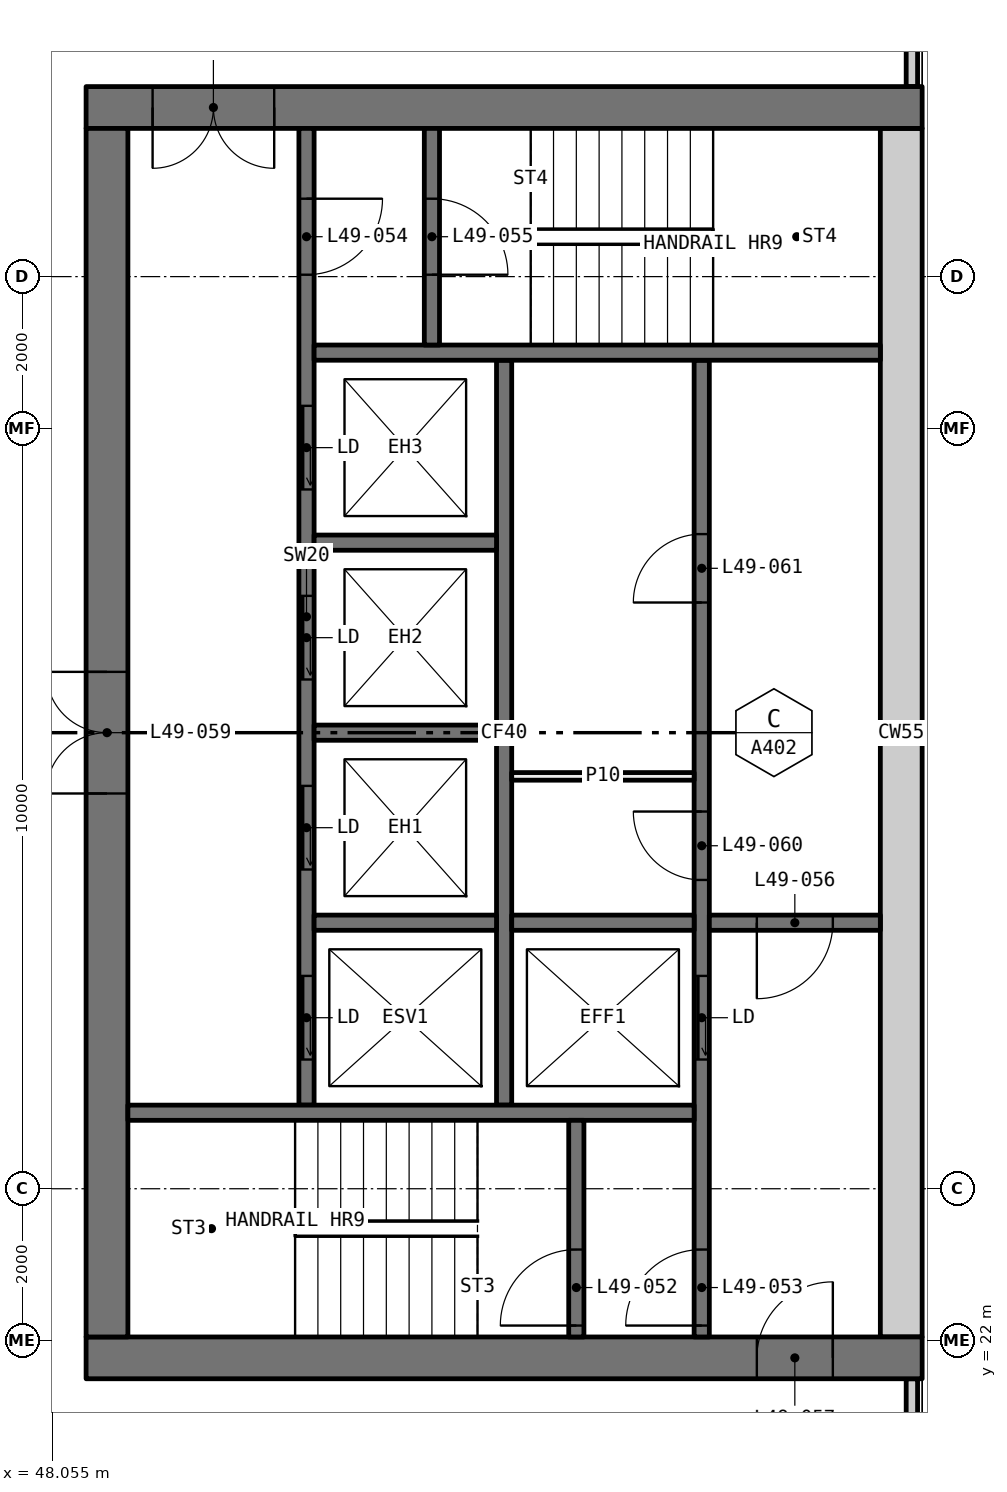
"""IFC4 building model, lengths in metres.
Left out: names, types, materials, properties, quantities, classifications, styles, units other than length and angle.
Written with IfcOpenShell. Run it as: python <this file> out.ifc"""

import sys

from ifc_helpers import new_model, si_unit, direction, frame, frame_2d, origin, place, context, subcontext, project, spatial, rectangle, extrude, element, fill, save


model = new_model("IFC4")
c1 = context("Model", 3, precision=1e-05, world=origin(), true_north=direction((0.0, 1.0)))
c2 = subcontext(c1, "Body", "Model", "MODEL_VIEW")
j1 = project(units=[si_unit("LENGTHUNIT", "METRE"), si_unit("PLANEANGLEUNIT", "RADIAN")], contexts=[c1])
p1 = place(None, origin())
s1 = spatial("IfcSite", under=j1, at=p1, CompositionType="ELEMENT")
p2 = place(p1, origin())
s2 = spatial("IfcBuilding", under=s1, at=p2, CompositionType="ELEMENT")
p3 = place(p2, frame((0.0, 0.0, 185.85)))
s3 = spatial("IfcBuildingStorey", under=s2, at=p3, CompositionType="ELEMENT", Elevation=185.85)
for number, where, z_axis, x_axis in (
    (1, (59.365, 18.71, 0.0), (0.0, 0.0, 1.0), (0.0, 1.0, 0.0)),
    (2, (59.365, 38.5, 0.0), (0.0, 0.0, 1.0), (0.0, 1.0, 0.0)),
):
    element("IfcWall", number, at=place(p3, frame(where, z_axis=z_axis, x_axis=x_axis)), inside=s3, PredefinedType="ELEMENTEDWALL", context=c2, shape_type="SweptSolid", body=[
        extrude(rectangle(XDim=2.79, YDim=0.15, at=frame_2d((1.395, 0.0))), origin(), (0.0, 0.0, 1.0), 3.05),
    ])
p4 = place(p3, frame((59.5, 21.775, 0.0), z_axis=(0.0, 0.0, 1.0), x_axis=(-1.0, 0.0, 0.0)))
e3 = element("IfcWall", 3, at=p4, inside=s3, PredefinedType="SHEAR", context=c2, shape_type="SweptSolid", body=[
    extrude(rectangle(XDim=11.0, YDim=0.55, at=frame_2d((5.5, 0.0))), origin(), (0.0, 0.0, 1.0), 3.05),
])
p5 = place(p4, frame((1.175, 0.0, 0.0)))
e4 = element("IfcOpeningElement", 4, at=p5, cuts=e3, PredefinedType="OPENING", context=c2, shape_type="SweptSolid", body=[
    extrude(rectangle(XDim=1.0, YDim=2.1, at=frame_2d((0.5, 1.05))), frame((0.0, 0.285, 0.0), z_axis=(0.0, -1.0, 0.0), x_axis=(1.0, 0.0, 0.0)), (0.0, 0.0, 1.0), 0.57),
])
p6 = place(p3, frame((59.5, 38.225, 0.0), z_axis=(0.0, 0.0, 1.0), x_axis=(-1.0, 0.0, 0.0)))
e5 = element("IfcWall", 5, at=p6, inside=s3, PredefinedType="SHEAR", context=c2, shape_type="SweptSolid", body=[
    extrude(rectangle(XDim=11.0, YDim=0.55, at=frame_2d((5.5, 0.0))), origin(), (0.0, 0.0, 1.0), 3.05),
])
p7 = place(p6, frame((8.525, 0.0, 0.0)))
e6 = element("IfcOpeningElement", 6, at=p7, cuts=e5, PredefinedType="OPENING", context=c2, shape_type="SweptSolid", body=[
    extrude(rectangle(XDim=1.6, YDim=2.1, at=frame_2d((0.8, 1.05))), frame((0.0, 0.285, 0.0), z_axis=(0.0, -1.0, 0.0), x_axis=(1.0, 0.0, 0.0)), (0.0, 0.0, 1.0), 0.57),
])
p8 = place(p3, frame((59.225, 22.05, 0.0), z_axis=(0.0, 0.0, 1.0), x_axis=(0.0, 1.0, 0.0)))
e7 = element("IfcWall", 7, at=p8, inside=s3, PredefinedType="SHEAR", context=c2, shape_type="SweptSolid", body=[
    extrude(rectangle(XDim=15.9, YDim=0.55, at=frame_2d((7.95, 0.0))), origin(), (0.0, 0.0, 1.0), 3.05),
])
p9 = place(p3, frame((48.775, 22.05, 0.0), z_axis=(0.0, 0.0, 1.0), x_axis=(0.0, 1.0, 0.0)))
e8 = element("IfcWall", 8, at=p9, inside=s3, PredefinedType="SHEAR", context=c2, shape_type="SweptSolid", body=[
    extrude(rectangle(XDim=15.9, YDim=0.55, at=frame_2d((7.95, 0.0))), origin(), (0.0, 0.0, 1.0), 3.05),
])
p10 = place(p9, frame((7.15, 0.0, 0.0)))
e9 = element("IfcOpeningElement", 9, at=p10, cuts=e8, PredefinedType="OPENING", context=c2, shape_type="SweptSolid", body=[
    extrude(rectangle(XDim=1.6, YDim=2.1, at=frame_2d((0.8, 1.05))), frame((0.0, 0.285, 0.0), z_axis=(0.0, -1.0, 0.0), x_axis=(1.0, 0.0, 0.0)), (0.0, 0.0, 1.0), 0.57),
])
p11 = place(p3, frame((56.6, 22.05, 0.0), z_axis=(0.0, 0.0, 1.0), x_axis=(0.0, 1.0, 0.0)))
e10 = element("IfcWall", 10, at=p11, inside=s3, PredefinedType="SOLIDWALL", context=c2, shape_type="SweptSolid", body=[
    extrude(rectangle(XDim=12.85, YDim=0.2, at=frame_2d((6.425, 0.0))), origin(), (0.0, 0.0, 1.0), 3.05),
])
p12 = place(p11, frame((3.65, 0.0, 0.0)))
e11 = element("IfcOpeningElement", 11, at=p12, cuts=e10, PredefinedType="OPENING", context=c2, shape_type="SweptSolid", body=[
    extrude(rectangle(XDim=1.1, YDim=2.1, at=frame_2d((0.55, 1.05))), frame((0.0, 0.11, 0.0), z_axis=(0.0, -1.0, 0.0), x_axis=(1.0, 0.0, 0.0)), (0.0, 0.0, 1.0), 0.22),
])
p13 = place(p11, frame((0.15, 0.0, 0.0)))
e12 = element("IfcOpeningElement", 12, at=p13, cuts=e10, PredefinedType="OPENING", context=c2, shape_type="SweptSolid", body=[
    extrude(rectangle(XDim=1.0, YDim=2.1, at=frame_2d((0.5, 1.05))), frame((0.0, 0.11, 0.0), z_axis=(0.0, -1.0, 0.0), x_axis=(1.0, 0.0, 0.0)), (0.0, 0.0, 1.0), 0.22),
])
p14 = place(p11, frame((6.012, 0.0, 0.0)))
e13 = element("IfcOpeningElement", 13, at=p14, cuts=e10, PredefinedType="OPENING", context=c2, shape_type="SweptSolid", body=[
    extrude(rectangle(XDim=0.9, YDim=2.1, at=frame_2d((0.45, 1.05))), frame((0.0, 0.11, 0.0), z_axis=(0.0, -1.0, 0.0), x_axis=(1.0, 0.0, 0.0)), (0.0, 0.0, 1.0), 0.22),
])
p15 = place(p11, frame((9.663, 0.0, 0.0)))
e14 = element("IfcOpeningElement", 14, at=p15, cuts=e10, PredefinedType="OPENING", context=c2, shape_type="SweptSolid", body=[
    extrude(rectangle(XDim=0.9, YDim=2.1, at=frame_2d((0.45, 1.05))), frame((0.0, 0.11, 0.0), z_axis=(0.0, -1.0, 0.0), x_axis=(1.0, 0.0, 0.0)), (0.0, 0.0, 1.0), 0.22),
])
p16 = place(p3, frame((51.4, 25.1, 0.0), z_axis=(0.0, 0.0, 1.0), x_axis=(0.0, 1.0, 0.0)))
e15 = element("IfcWall", 15, at=p16, inside=s3, PredefinedType="SOLIDWALL", context=c2, shape_type="SweptSolid", body=[
    extrude(rectangle(XDim=12.85, YDim=0.2, at=frame_2d((6.425, 0.0))), origin(), (0.0, 0.0, 1.0), 3.05),
])
p17 = place(p16, frame((0.6, 0.0, 0.0)))
e16 = element("IfcOpeningElement", 16, at=p17, cuts=e15, PredefinedType="OPENING", context=c2, shape_type="SweptSolid", body=[
    extrude(rectangle(XDim=1.1, YDim=2.1, at=frame_2d((0.55, 1.05))), frame((0.0, 0.11, 0.0), z_axis=(0.0, -1.0, 0.0), x_axis=(1.0, 0.0, 0.0)), (0.0, 0.0, 1.0), 0.22),
])
p18 = place(p16, frame((3.1, 0.0, 0.0)))
e17 = element("IfcOpeningElement", 17, at=p18, cuts=e15, PredefinedType="OPENING", context=c2, shape_type="SweptSolid", body=[
    extrude(rectangle(XDim=1.1, YDim=2.1, at=frame_2d((0.55, 1.05))), frame((0.0, 0.11, 0.0), z_axis=(0.0, -1.0, 0.0), x_axis=(1.0, 0.0, 0.0)), (0.0, 0.0, 1.0), 0.22),
])
p19 = place(p16, frame((5.6, 0.0, 0.0)))
e18 = element("IfcOpeningElement", 18, at=p19, cuts=e15, PredefinedType="OPENING", context=c2, shape_type="SweptSolid", body=[
    extrude(rectangle(XDim=1.1, YDim=2.1, at=frame_2d((0.55, 1.05))), frame((0.0, 0.11, 0.0), z_axis=(0.0, -1.0, 0.0), x_axis=(1.0, 0.0, 0.0)), (0.0, 0.0, 1.0), 0.22),
])
p20 = place(p16, frame((8.1, 0.0, 0.0)))
e19 = element("IfcOpeningElement", 19, at=p20, cuts=e15, PredefinedType="OPENING", context=c2, shape_type="SweptSolid", body=[
    extrude(rectangle(XDim=1.1, YDim=2.1, at=frame_2d((0.55, 1.05))), frame((0.0, 0.11, 0.0), z_axis=(0.0, -1.0, 0.0), x_axis=(1.0, 0.0, 0.0)), (0.0, 0.0, 1.0), 0.22),
])
p21 = place(p16, frame((10.925, 0.0, 0.0)))
e20 = element("IfcOpeningElement", 20, at=p21, cuts=e15, PredefinedType="OPENING", context=c2, shape_type="SweptSolid", body=[
    extrude(rectangle(XDim=1.0, YDim=2.1, at=frame_2d((0.5, 1.05))), frame((0.0, 0.11, 0.0), z_axis=(0.0, -1.0, 0.0), x_axis=(1.0, 0.0, 0.0)), (0.0, 0.0, 1.0), 0.22),
])
p22 = place(p3, frame((54.0, 25.1, 0.0), z_axis=(0.0, 0.0, 1.0), x_axis=(0.0, 1.0, 0.0)))
e21 = element("IfcWall", 21, at=p22, inside=s3, PredefinedType="SOLIDWALL", context=c2, shape_type="SweptSolid", body=[
    extrude(rectangle(XDim=9.8, YDim=0.2, at=frame_2d((4.9, 0.0))), origin(), (0.0, 0.0, 1.0), 3.05),
])
for number, where, z_axis, x_axis in (
    (22, (56.5, 25.0, 0.0), (0.0, 0.0, 1.0), (-1.0, 0.0, 0.0)),
    (23, (58.95, 35.0, 0.0), (0.0, 0.0, 1.0), (-1.0, 0.0, 0.0)),
):
    element("IfcWall", number, at=place(p3, frame(where, z_axis=z_axis, x_axis=x_axis)), inside=s3, PredefinedType="SOLIDWALL", context=c2, shape_type="SweptSolid", body=[
        extrude(rectangle(XDim=7.45, YDim=0.2, at=frame_2d((3.725, 0.0))), origin(), (0.0, 0.0, 1.0), 3.05),
    ])
p23 = place(p3, frame((58.95, 27.5, 0.0), z_axis=(0.0, 0.0, 1.0), x_axis=(-1.0, 0.0, 0.0)))
e24 = element("IfcWall", 24, at=p23, inside=s3, PredefinedType="SOLIDWALL", context=c2, shape_type="SweptSolid", body=[
    extrude(rectangle(XDim=2.25, YDim=0.2, at=frame_2d((1.125, 0.0))), origin(), (0.0, 0.0, 1.0), 3.05),
])
p24 = place(p23, frame((0.625, 0.0, 0.0)))
e25 = element("IfcOpeningElement", 25, at=p24, cuts=e24, PredefinedType="OPENING", context=c2, shape_type="SweptSolid", body=[
    extrude(rectangle(XDim=1.0, YDim=2.1, at=frame_2d((0.5, 1.05))), frame((0.0, 0.11, 0.0), z_axis=(0.0, -1.0, 0.0), x_axis=(1.0, 0.0, 0.0)), (0.0, 0.0, 1.0), 0.22),
])
p25 = place(p3, frame((54.95, 22.05, 0.0), z_axis=(0.0, 0.0, 1.0), x_axis=(0.0, 1.0, 0.0)))
e26 = element("IfcWall", 26, at=p25, inside=s3, PredefinedType="SOLIDWALL", context=c2, shape_type="SweptSolid", body=[
    extrude(rectangle(XDim=2.85, YDim=0.2, at=frame_2d((1.425, 0.0))), origin(), (0.0, 0.0, 1.0), 3.05),
])
p26 = place(p25, frame((0.15, 0.0, 0.0)))
e27 = element("IfcOpeningElement", 27, at=p26, cuts=e26, PredefinedType="OPENING", context=c2, shape_type="SweptSolid", body=[
    extrude(rectangle(XDim=1.0, YDim=2.1, at=frame_2d((0.5, 1.05))), frame((0.0, 0.11, 0.0), z_axis=(0.0, -1.0, 0.0), x_axis=(1.0, 0.0, 0.0)), (0.0, 0.0, 1.0), 0.22),
])
p27 = place(p3, frame((53.05, 35.1, 0.0), z_axis=(0.0, 0.0, 1.0), x_axis=(0.0, 1.0, 0.0)))
e28 = element("IfcWall", 28, at=p27, inside=s3, PredefinedType="SOLIDWALL", context=c2, shape_type="SweptSolid", body=[
    extrude(rectangle(XDim=2.85, YDim=0.2, at=frame_2d((1.425, 0.0))), origin(), (0.0, 0.0, 1.0), 3.05),
])
p28 = place(p27, frame((0.925, 0.0, 0.0)))
e29 = element("IfcOpeningElement", 29, at=p28, cuts=e28, PredefinedType="OPENING", context=c2, shape_type="SweptSolid", body=[
    extrude(rectangle(XDim=1.0, YDim=2.1, at=frame_2d((0.5, 1.05))), frame((0.0, 0.11, 0.0), z_axis=(0.0, -1.0, 0.0), x_axis=(1.0, 0.0, 0.0)), (0.0, 0.0, 1.0), 0.22),
])
for number, where, z_axis, x_axis in (
    (30, (56.5, 27.5, 0.0), (0.0, 0.0, 1.0), (-1.0, 0.0, 0.0)),
    (31, (53.9, 27.5, 0.0), (0.0, 0.0, 1.0), (-1.0, 0.0, 0.0)),
    (32, (53.9, 30.0, 0.0), (0.0, 0.0, 1.0), (-1.0, 0.0, 0.0)),
    (33, (53.9, 32.5, 0.0), (0.0, 0.0, 1.0), (-1.0, 0.0, 0.0)),
):
    element("IfcWall", number, at=place(p3, frame(where, z_axis=z_axis, x_axis=x_axis)), inside=s3, PredefinedType="SOLIDWALL", context=c2, shape_type="SweptSolid", body=[
        extrude(rectangle(XDim=2.4, YDim=0.2, at=frame_2d((1.2, 0.0))), origin(), (0.0, 0.0, 1.0), 3.05),
    ])
p29 = place(p3, frame((56.5, 29.425, 0.0), z_axis=(0.0, 0.0, 1.0), x_axis=(-1.0, 0.0, 0.0)))
e34 = element("IfcWall", 34, at=p29, inside=s3, PredefinedType="PARTITIONING", context=c2, shape_type="SweptSolid", body=[
    extrude(rectangle(XDim=2.4, YDim=0.1, at=frame_2d((1.2, 0.0))), origin(), (0.0, 0.0, 1.0), 3.05),
])
p30 = place(p17, origin())
e35 = element("IfcDoor", 35, at=p30, inside=s3, OperationType="SLIDING_TO_LEFT", PredefinedType="DOOR", context=c2, shape_type="SweptSolid", body=[
    extrude(rectangle(XDim=1.1, YDim=2.1, at=frame_2d((0.55, 1.05))), frame((0.0, 0.025, 0.0), z_axis=(0.0, -1.0, 0.0), x_axis=(1.0, 0.0, 0.0)), (0.0, 0.0, 1.0), 0.05),
])
fill(e16, e35)
p31 = place(p18, origin())
e36 = element("IfcDoor", 36, at=p31, inside=s3, OperationType="SLIDING_TO_LEFT", PredefinedType="DOOR", context=c2, shape_type="SweptSolid", body=[
    extrude(rectangle(XDim=1.1, YDim=2.1, at=frame_2d((0.55, 1.05))), frame((0.0, 0.025, 0.0), z_axis=(0.0, -1.0, 0.0), x_axis=(1.0, 0.0, 0.0)), (0.0, 0.0, 1.0), 0.05),
])
fill(e17, e36)
p32 = place(p19, origin())
e37 = element("IfcDoor", 37, at=p32, inside=s3, OperationType="SLIDING_TO_LEFT", PredefinedType="DOOR", context=c2, shape_type="SweptSolid", body=[
    extrude(rectangle(XDim=1.1, YDim=2.1, at=frame_2d((0.55, 1.05))), frame((0.0, 0.025, 0.0), z_axis=(0.0, -1.0, 0.0), x_axis=(1.0, 0.0, 0.0)), (0.0, 0.0, 1.0), 0.05),
])
fill(e18, e37)
p33 = place(p20, origin())
e38 = element("IfcDoor", 38, at=p33, inside=s3, OperationType="SLIDING_TO_LEFT", PredefinedType="DOOR", context=c2, shape_type="SweptSolid", body=[
    extrude(rectangle(XDim=1.1, YDim=2.1, at=frame_2d((0.55, 1.05))), frame((0.0, 0.025, 0.0), z_axis=(0.0, -1.0, 0.0), x_axis=(1.0, 0.0, 0.0)), (0.0, 0.0, 1.0), 0.05),
])
fill(e19, e38)
p34 = place(p12, origin())
e39 = element("IfcDoor", 39, at=p34, inside=s3, OperationType="SLIDING_TO_LEFT", PredefinedType="DOOR", context=c2, shape_type="SweptSolid", body=[
    extrude(rectangle(XDim=1.1, YDim=2.1, at=frame_2d((0.55, 1.05))), frame((0.0, 0.025, 0.0), z_axis=(0.0, -1.0, 0.0), x_axis=(1.0, 0.0, 0.0)), (0.0, 0.0, 1.0), 0.05),
])
fill(e11, e39)
p35 = place(p26, origin())
e40 = element("IfcDoor", 40, at=p35, inside=s3, OperationType="SINGLE_SWING_RIGHT", PredefinedType="DOOR", context=c2, shape_type="SweptSolid", body=[
    extrude(rectangle(XDim=1.0, YDim=2.1, at=frame_2d((0.5, 1.05))), frame((0.0, 0.025, 0.0), z_axis=(0.0, -1.0, 0.0), x_axis=(1.0, 0.0, 0.0)), (0.0, 0.0, 1.0), 0.05),
])
fill(e27, e40)
p36 = place(p13, origin())
e41 = element("IfcDoor", 41, at=p36, inside=s3, OperationType="SINGLE_SWING_RIGHT", PredefinedType="DOOR", context=c2, shape_type="SweptSolid", body=[
    extrude(rectangle(XDim=1.0, YDim=2.1, at=frame_2d((0.5, 1.05))), frame((0.0, 0.025, 0.0), z_axis=(0.0, -1.0, 0.0), x_axis=(1.0, 0.0, 0.0)), (0.0, 0.0, 1.0), 0.05),
])
fill(e12, e41)
p37 = place(p21, frame((1.0, 0.0, 0.0), x_axis=(-1.0, 0.0, 0.0)))
e42 = element("IfcDoor", 42, at=p37, inside=s3, OperationType="SINGLE_SWING_RIGHT", PredefinedType="DOOR", context=c2, shape_type="SweptSolid", body=[
    extrude(rectangle(XDim=1.0, YDim=2.1, at=frame_2d((0.5, 1.05))), frame((0.0, 0.025, 0.0), z_axis=(0.0, -1.0, 0.0), x_axis=(1.0, 0.0, 0.0)), (0.0, 0.0, 1.0), 0.05),
])
fill(e20, e42)
p38 = place(p28, frame((1.0, 0.0, 0.0), x_axis=(-1.0, 0.0, 0.0)))
e43 = element("IfcDoor", 43, at=p38, inside=s3, OperationType="SINGLE_SWING_LEFT", PredefinedType="DOOR", context=c2, shape_type="SweptSolid", body=[
    extrude(rectangle(XDim=1.0, YDim=2.1, at=frame_2d((0.5, 1.05))), frame((0.0, 0.025, 0.0), z_axis=(0.0, -1.0, 0.0), x_axis=(1.0, 0.0, 0.0)), (0.0, 0.0, 1.0), 0.05),
])
fill(e29, e43)
p39 = place(p24, origin())
e44 = element("IfcDoor", 44, at=p39, inside=s3, OperationType="SINGLE_SWING_LEFT", PredefinedType="DOOR", context=c2, shape_type="SweptSolid", body=[
    extrude(rectangle(XDim=1.0, YDim=2.1, at=frame_2d((0.5, 1.05))), frame((0.0, 0.025, 0.0), z_axis=(0.0, -1.0, 0.0), x_axis=(1.0, 0.0, 0.0)), (0.0, 0.0, 1.0), 0.05),
])
fill(e25, e44)
p40 = place(p5, frame((1.0, 0.0, 0.0), x_axis=(-1.0, 0.0, 0.0)))
e45 = element("IfcDoor", 45, at=p40, inside=s3, OperationType="SINGLE_SWING_LEFT", PredefinedType="DOOR", context=c2, shape_type="SweptSolid", body=[
    extrude(rectangle(XDim=1.0, YDim=2.1, at=frame_2d((0.5, 1.05))), frame((0.0, 0.025, 0.0), z_axis=(0.0, -1.0, 0.0), x_axis=(1.0, 0.0, 0.0)), (0.0, 0.0, 1.0), 0.05),
])
fill(e4, e45)
p41 = place(p7, origin())
e46 = element("IfcDoor", 46, at=p41, inside=s3, OperationType="DOUBLE_DOOR_SINGLE_SWING", PredefinedType="DOOR", context=c2, shape_type="SweptSolid", body=[
    extrude(rectangle(XDim=1.6, YDim=2.1, at=frame_2d((0.8, 1.05))), frame((0.0, 0.025, 0.0), z_axis=(0.0, -1.0, 0.0), x_axis=(1.0, 0.0, 0.0)), (0.0, 0.0, 1.0), 0.05),
])
fill(e6, e46)
p42 = place(p10, origin())
e47 = element("IfcDoor", 47, at=p42, inside=s3, OperationType="DOUBLE_DOOR_SINGLE_SWING", PredefinedType="DOOR", context=c2, shape_type="SweptSolid", body=[
    extrude(rectangle(XDim=1.6, YDim=2.1, at=frame_2d((0.8, 1.05))), frame((0.0, 0.025, 0.0), z_axis=(0.0, -1.0, 0.0), x_axis=(1.0, 0.0, 0.0)), (0.0, 0.0, 1.0), 0.05),
])
fill(e9, e47)
p43 = place(p14, origin())
e48 = element("IfcDoor", 48, at=p43, inside=s3, OperationType="SINGLE_SWING_LEFT", PredefinedType="DOOR", context=c2, shape_type="SweptSolid", body=[
    extrude(rectangle(XDim=0.9, YDim=2.1, at=frame_2d((0.45, 1.05))), frame((0.0, 0.025, 0.0), z_axis=(0.0, -1.0, 0.0), x_axis=(1.0, 0.0, 0.0)), (0.0, 0.0, 1.0), 0.05),
])
fill(e13, e48)
p44 = place(p15, origin())
e49 = element("IfcDoor", 49, at=p44, inside=s3, OperationType="SINGLE_SWING_RIGHT", PredefinedType="DOOR", context=c2, shape_type="SweptSolid", body=[
    extrude(rectangle(XDim=0.9, YDim=2.1, at=frame_2d((0.45, 1.05))), frame((0.0, 0.025, 0.0), z_axis=(0.0, -1.0, 0.0), x_axis=(1.0, 0.0, 0.0)), (0.0, 0.0, 1.0), 0.05),
])
fill(e14, e49)
save(model, sys.argv[1])
